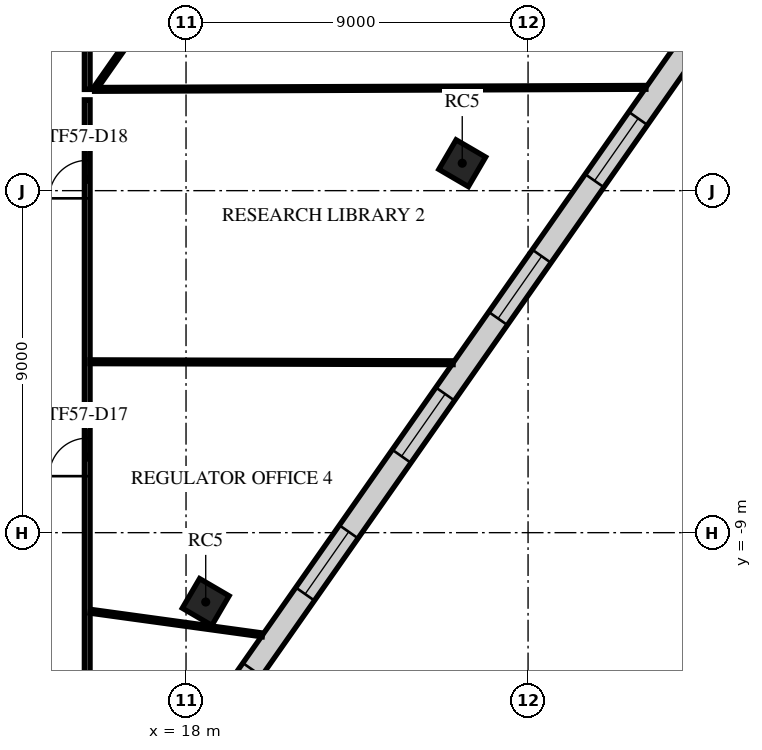
"""IFC4 building model, lengths in metres.
Left out: names, types, materials, properties, quantities, classifications, styles, units other than length and angle.
Written with IfcOpenShell. Run it as: python <this file> out.ifc"""

import sys

from ifc_helpers import new_model, si_unit, direction, frame, frame_2d, origin, origin_2d, place, context, subcontext, project, spatial, rectangle, extrude, element, fill, save


model = new_model("IFC4")
c1 = context("Model", 3, precision=1e-05, world=origin(), true_north=direction((0.0, 1.0)))
c2 = subcontext(c1, "Body", "Model", "MODEL_VIEW")
j1 = project(units=[si_unit("LENGTHUNIT", "METRE"), si_unit("PLANEANGLEUNIT", "RADIAN")], contexts=[c1])
p1 = place(None, origin())
s1 = spatial("IfcSite", under=j1, at=p1, CompositionType="ELEMENT")
p2 = place(p1, origin())
s2 = spatial("IfcBuilding", under=s1, at=p2, CompositionType="ELEMENT")
p3 = place(p2, frame((0.0, 0.0, 242.9)))
s3 = spatial("IfcBuildingStorey", under=s2, at=p3, CompositionType="ELEMENT", Elevation=242.9)
for number, where, z_axis, x_axis in (
    (1, (18.518, -10.825, -0.36), (0.0, 0.0, 1.0), (0.505, 0.863, 0.0)),
    (2, (25.268, 0.722, -0.36), (0.0, 0.0, 1.0), (0.505, 0.863, 0.0)),
):
    element("IfcColumn", number, at=place(p3, frame(where, z_axis=z_axis, x_axis=x_axis)), inside=s3, PredefinedType="COLUMN", context=c2, shape_type="SweptSolid", body=[
        extrude(rectangle(XDim=0.9, YDim=0.9, at=origin_2d()), origin(), (0.0, 0.0, 1.0), 4.36),
    ])
p4 = place(p3, frame((5.206, -33.362, 0.0), z_axis=(0.0, 0.0, 1.0), x_axis=(0.573577438409, 0.81915134264, 0.0)))
e3 = element("IfcWall", 3, at=p4, inside=s3, PredefinedType="STANDARD", context=c2, shape_type="SweptSolid", body=[
    extrude(rectangle(XDim=48.686, YDim=0.6, at=frame_2d((24.343, 0.0))), origin(), (0.0, 0.0, 1.0), 3.64),
])
p5 = place(p4, frame((1.213, 0.0, 0.9)))
e4 = element("IfcOpeningElement", 4, at=p5, cuts=e3, PredefinedType="OPENING", context=c2, shape_type="SweptSolid", body=[
    extrude(rectangle(XDim=2.0, YDim=2.1, at=frame_2d((1.0, 1.05))), frame((0.0, 0.31, 0.0), z_axis=(0.0, -1.0, 0.0), x_axis=(1.0, 0.0, 0.0)), (0.0, 0.0, 1.0), 0.62),
])
p6 = place(p4, frame((5.639, 0.0, 0.9)))
e5 = element("IfcOpeningElement", 5, at=p6, cuts=e3, PredefinedType="OPENING", context=c2, shape_type="SweptSolid", body=[
    extrude(rectangle(XDim=2.0, YDim=2.1, at=frame_2d((1.0, 1.05))), frame((0.0, 0.31, 0.0), z_axis=(0.0, -1.0, 0.0), x_axis=(1.0, 0.0, 0.0)), (0.0, 0.0, 1.0), 0.62),
])
p7 = place(p4, frame((10.065, 0.0, 0.9)))
e6 = element("IfcOpeningElement", 6, at=p7, cuts=e3, PredefinedType="OPENING", context=c2, shape_type="SweptSolid", body=[
    extrude(rectangle(XDim=2.0, YDim=2.1, at=frame_2d((1.0, 1.05))), frame((0.0, 0.31, 0.0), z_axis=(0.0, -1.0, 0.0), x_axis=(1.0, 0.0, 0.0)), (0.0, 0.0, 1.0), 0.62),
])
p8 = place(p4, frame((14.491, 0.0, 0.9)))
e7 = element("IfcOpeningElement", 7, at=p8, cuts=e3, PredefinedType="OPENING", context=c2, shape_type="SweptSolid", body=[
    extrude(rectangle(XDim=2.0, YDim=2.1, at=frame_2d((1.0, 1.05))), frame((0.0, 0.31, 0.0), z_axis=(0.0, -1.0, 0.0), x_axis=(1.0, 0.0, 0.0)), (0.0, 0.0, 1.0), 0.62),
])
p9 = place(p4, frame((18.917, 0.0, 0.9)))
e8 = element("IfcOpeningElement", 8, at=p9, cuts=e3, PredefinedType="OPENING", context=c2, shape_type="SweptSolid", body=[
    extrude(rectangle(XDim=2.0, YDim=2.1, at=frame_2d((1.0, 1.05))), frame((0.0, 0.31, 0.0), z_axis=(0.0, -1.0, 0.0), x_axis=(1.0, 0.0, 0.0)), (0.0, 0.0, 1.0), 0.62),
])
p10 = place(p4, frame((23.343, 0.0, 0.9)))
e9 = element("IfcOpeningElement", 9, at=p10, cuts=e3, PredefinedType="OPENING", context=c2, shape_type="SweptSolid", body=[
    extrude(rectangle(XDim=2.0, YDim=2.1, at=frame_2d((1.0, 1.05))), frame((0.0, 0.31, 0.0), z_axis=(0.0, -1.0, 0.0), x_axis=(1.0, 0.0, 0.0)), (0.0, 0.0, 1.0), 0.62),
])
p11 = place(p4, frame((27.769, 0.0, 0.9)))
e10 = element("IfcOpeningElement", 10, at=p11, cuts=e3, PredefinedType="OPENING", context=c2, shape_type="SweptSolid", body=[
    extrude(rectangle(XDim=2.0, YDim=2.1, at=frame_2d((1.0, 1.05))), frame((0.0, 0.31, 0.0), z_axis=(0.0, -1.0, 0.0), x_axis=(1.0, 0.0, 0.0)), (0.0, 0.0, 1.0), 0.62),
])
p12 = place(p4, frame((32.195, 0.0, 0.9)))
e11 = element("IfcOpeningElement", 11, at=p12, cuts=e3, PredefinedType="OPENING", context=c2, shape_type="SweptSolid", body=[
    extrude(rectangle(XDim=2.0, YDim=2.1, at=frame_2d((1.0, 1.05))), frame((0.0, 0.31, 0.0), z_axis=(0.0, -1.0, 0.0), x_axis=(1.0, 0.0, 0.0)), (0.0, 0.0, 1.0), 0.62),
])
p13 = place(p4, frame((36.621, 0.0, 0.9)))
e12 = element("IfcOpeningElement", 12, at=p13, cuts=e3, PredefinedType="OPENING", context=c2, shape_type="SweptSolid", body=[
    extrude(rectangle(XDim=2.0, YDim=2.1, at=frame_2d((1.0, 1.05))), frame((0.0, 0.31, 0.0), z_axis=(0.0, -1.0, 0.0), x_axis=(1.0, 0.0, 0.0)), (0.0, 0.0, 1.0), 0.62),
])
p14 = place(p4, frame((41.047, 0.0, 0.9)))
e13 = element("IfcOpeningElement", 13, at=p14, cuts=e3, PredefinedType="OPENING", context=c2, shape_type="SweptSolid", body=[
    extrude(rectangle(XDim=2.0, YDim=2.1, at=frame_2d((1.0, 1.05))), frame((0.0, 0.31, 0.0), z_axis=(0.0, -1.0, 0.0), x_axis=(1.0, 0.0, 0.0)), (0.0, 0.0, 1.0), 0.62),
])
p15 = place(p4, frame((45.473, 0.0, 0.9)))
e14 = element("IfcOpeningElement", 14, at=p15, cuts=e3, PredefinedType="OPENING", context=c2, shape_type="SweptSolid", body=[
    extrude(rectangle(XDim=2.0, YDim=2.1, at=frame_2d((1.0, 1.05))), frame((0.0, 0.31, 0.0), z_axis=(0.0, -1.0, 0.0), x_axis=(1.0, 0.0, 0.0)), (0.0, 0.0, 1.0), 0.62),
])
p16 = place(p3, frame((15.4, -15.325, 0.0), z_axis=(0.0, 0.0, 1.0), x_axis=(0.0, 1.0, 0.0)))
e15 = element("IfcWall", 15, at=p16, inside=s3, PredefinedType="PARTITIONING", context=c2, shape_type="SweptSolid", body=[
    extrude(rectangle(XDim=17.715, YDim=0.15, at=frame_2d((8.857, 0.0))), origin(), (0.0, 0.0, 1.0), 3.24),
])
p17 = place(p16, frame((7.812, 0.0, 0.0)))
e16 = element("IfcOpeningElement", 16, at=p17, cuts=e15, PredefinedType="OPENING", context=c2, shape_type="SweptSolid", body=[
    extrude(rectangle(XDim=1.0, YDim=2.1, at=frame_2d((0.5, 1.05))), frame((0.0, 0.085, 0.0), z_axis=(0.0, -1.0, 0.0), x_axis=(1.0, 0.0, 0.0)), (0.0, 0.0, 1.0), 0.17),
])
p18 = place(p16, frame((15.123, 0.0, 0.0)))
e17 = element("IfcOpeningElement", 17, at=p18, cuts=e15, PredefinedType="OPENING", context=c2, shape_type="SweptSolid", body=[
    extrude(rectangle(XDim=1.0, YDim=2.1, at=frame_2d((0.5, 1.05))), frame((0.0, 0.085, 0.0), z_axis=(0.0, -1.0, 0.0), x_axis=(1.0, 0.0, 0.0)), (0.0, 0.0, 1.0), 0.17),
])
p19 = place(p3, frame((15.4, 2.664, 0.0), z_axis=(0.0, 0.0, 1.0), x_axis=(0.0, 1.0, 0.0)))
e18 = element("IfcWall", 18, at=p19, inside=s3, PredefinedType="PARTITIONING", context=c2, shape_type="SweptSolid", body=[
    extrude(rectangle(XDim=9.526, YDim=0.15, at=frame_2d((4.763, 0.0))), origin(), (0.0, 0.0, 1.0), 3.24),
])
p20 = place(p3, frame((15.482, -11.068, 0.0), z_axis=(0.0, 0.0, 1.0), x_axis=(0.990680100766, -0.136209169832, 0.0)))
e19 = element("IfcWall", 19, at=p20, inside=s3, PredefinedType="PARTITIONING", context=c2, shape_type="SweptSolid", body=[
    extrude(rectangle(XDim=4.573, YDim=0.1, at=frame_2d((2.286, 0.0))), origin(), (0.0, 0.0, 1.0), 3.12),
])
p21 = place(p3, frame((15.475, -4.502, 0.0), z_axis=(0.0, 0.0, 1.0), x_axis=(0.999996329774, -0.00270932448, 0.0)))
e20 = element("IfcWall", 20, at=p21, inside=s3, PredefinedType="PARTITIONING", context=c2, shape_type="SweptSolid", body=[
    extrude(rectangle(XDim=9.552, YDim=0.1, at=frame_2d((4.776, 0.0))), origin(), (0.0, 0.0, 1.0), 3.24),
])
p22 = place(p3, frame((15.593, 2.665, 0.0), z_axis=(0.0, 0.0, 1.0), x_axis=(0.999993270933, 0.003668526741, 0.0)))
e21 = element("IfcWall", 21, at=p22, inside=s3, PredefinedType="PARTITIONING", context=c2, shape_type="SweptSolid", body=[
    extrude(rectangle(XDim=14.508, YDim=0.1, at=frame_2d((7.254, 0.0))), origin(), (0.0, 0.0, 1.0), 3.64),
])
p23 = place(p3, frame((15.648, 2.744, 0.0), z_axis=(0.0, 0.0, 1.0), x_axis=(0.57357562998, 0.819152608915, 0.0)))
e22 = element("IfcWall", 22, at=p23, inside=s3, PredefinedType="PARTITIONING", context=c2, shape_type="SweptSolid", body=[
    extrude(rectangle(XDim=7.521, YDim=0.1, at=frame_2d((3.76, 0.0))), origin(), (0.0, 0.0, 1.0), 3.24),
])
p24 = place(p10, origin())
e23 = element("IfcWindow", 23, at=p24, inside=s3, PartitioningType="SINGLE_PANEL", PredefinedType="WINDOW", context=c2, shape_type="SweptSolid", body=[
    extrude(rectangle(XDim=2.0, YDim=2.1, at=frame_2d((1.0, 1.05))), frame((0.0, 0.03, 0.0), z_axis=(0.0, -1.0, 0.0), x_axis=(1.0, 0.0, 0.0)), (0.0, 0.0, 1.0), 0.06),
])
fill(e9, e23)
p25 = place(p11, origin())
e24 = element("IfcWindow", 24, at=p25, inside=s3, PartitioningType="SINGLE_PANEL", PredefinedType="WINDOW", context=c2, shape_type="SweptSolid", body=[
    extrude(rectangle(XDim=2.0, YDim=2.1, at=frame_2d((1.0, 1.05))), frame((0.0, 0.03, 0.0), z_axis=(0.0, -1.0, 0.0), x_axis=(1.0, 0.0, 0.0)), (0.0, 0.0, 1.0), 0.06),
])
fill(e10, e24)
p26 = place(p12, origin())
e25 = element("IfcWindow", 25, at=p26, inside=s3, PartitioningType="SINGLE_PANEL", PredefinedType="WINDOW", context=c2, shape_type="SweptSolid", body=[
    extrude(rectangle(XDim=2.0, YDim=2.1, at=frame_2d((1.0, 1.05))), frame((0.0, 0.03, 0.0), z_axis=(0.0, -1.0, 0.0), x_axis=(1.0, 0.0, 0.0)), (0.0, 0.0, 1.0), 0.06),
])
fill(e11, e25)
p27 = place(p13, origin())
e26 = element("IfcWindow", 26, at=p27, inside=s3, PartitioningType="SINGLE_PANEL", PredefinedType="WINDOW", context=c2, shape_type="SweptSolid", body=[
    extrude(rectangle(XDim=2.0, YDim=2.1, at=frame_2d((1.0, 1.05))), frame((0.0, 0.03, 0.0), z_axis=(0.0, -1.0, 0.0), x_axis=(1.0, 0.0, 0.0)), (0.0, 0.0, 1.0), 0.06),
])
fill(e12, e26)
p28 = place(p14, origin())
e27 = element("IfcWindow", 27, at=p28, inside=s3, PartitioningType="SINGLE_PANEL", PredefinedType="WINDOW", context=c2, shape_type="SweptSolid", body=[
    extrude(rectangle(XDim=2.0, YDim=2.1, at=frame_2d((1.0, 1.05))), frame((0.0, 0.03, 0.0), z_axis=(0.0, -1.0, 0.0), x_axis=(1.0, 0.0, 0.0)), (0.0, 0.0, 1.0), 0.06),
])
fill(e13, e27)
p29 = place(p17, frame((1.0, 0.0, 0.0), z_axis=(0.0, 0.0, 1.0), x_axis=(-1.0, 0.0, 0.0)))
e28 = element("IfcDoor", 28, at=p29, inside=s3, OperationType="SINGLE_SWING_RIGHT", PredefinedType="DOOR", context=c2, shape_type="SweptSolid", body=[
    extrude(rectangle(XDim=1.0, YDim=2.1, at=frame_2d((0.5, 1.05))), frame((0.0, 0.025, 0.0), z_axis=(0.0, -1.0, 0.0), x_axis=(1.0, 0.0, 0.0)), (0.0, 0.0, 1.0), 0.05),
])
fill(e16, e28)
p30 = place(p18, frame((1.0, 0.0, 0.0), z_axis=(0.0, 0.0, 1.0), x_axis=(-1.0, 0.0, 0.0)))
e29 = element("IfcDoor", 29, at=p30, inside=s3, OperationType="SINGLE_SWING_RIGHT", PredefinedType="DOOR", context=c2, shape_type="SweptSolid", body=[
    extrude(rectangle(XDim=1.0, YDim=2.1, at=frame_2d((0.5, 1.05))), frame((0.0, 0.025, 0.0), z_axis=(0.0, -1.0, 0.0), x_axis=(1.0, 0.0, 0.0)), (0.0, 0.0, 1.0), 0.05),
])
fill(e17, e29)
save(model, sys.argv[1])
